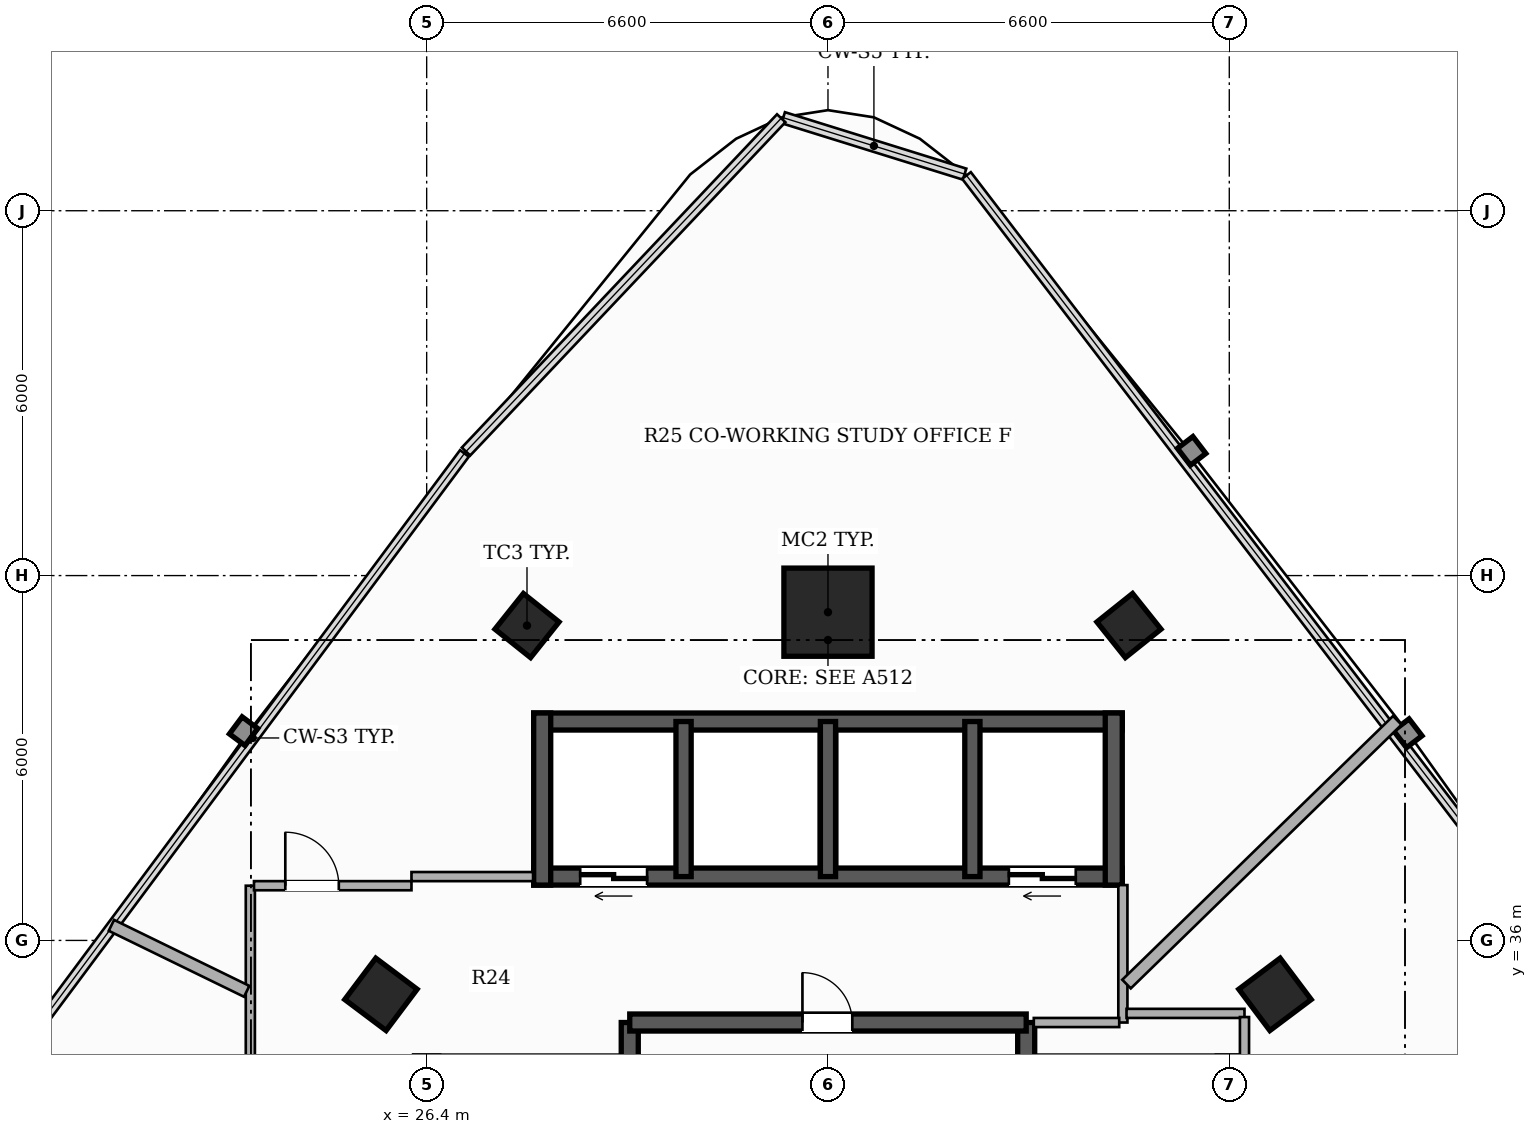
"""IFC4 building model, lengths in metres.
Left out: names, types, materials, properties, quantities, classifications, styles, units other than length and angle.
Written with IfcOpenShell. Run it as: python <this file> out.ifc"""

import sys

from ifc_helpers import new_model, si_unit, direction, frame, frame_2d, origin, origin_2d, place, context, subcontext, project, spatial, rectangle, hollow_rectangle, extrude, element, fill, save


model = new_model("IFC4")
c1 = context("Model", 3, precision=1e-05, world=origin(), true_north=direction((0.0, 1.0)))
c2 = subcontext(c1, "Body", "Model", "MODEL_VIEW")
j1 = project(units=[si_unit("LENGTHUNIT", "METRE"), si_unit("PLANEANGLEUNIT", "RADIAN")], contexts=[c1])
p1 = place(None, origin())
s1 = spatial("IfcSite", under=j1, at=p1, CompositionType="ELEMENT")
p2 = place(p1, origin())
s2 = spatial("IfcBuilding", under=s1, at=p2, CompositionType="ELEMENT")
p3 = place(p2, frame((0.0, 0.0, 113.3)))
s3 = spatial("IfcBuildingStorey", under=s2, at=p3, CompositionType="ELEMENT", Elevation=113.3)
p4 = place(p3, frame((29.74, 26.5, 0.0), z_axis=(0.0, 0.0, 1.0), x_axis=(0.0, 1.0, 0.0)))
e1 = element("IfcWall", 1, at=p4, inside=s3, PredefinedType="SHEAR", context=c2, shape_type="SweptSolid", body=[
    extrude(rectangle(XDim=8.15, YDim=0.28, at=frame_2d((4.075, 0.0))), origin(), (0.0, 0.0, 1.0), 3.3),
])
p5 = place(p4, frame((0.6, 0.0, 0.0)))
e2 = element("IfcOpeningElement", 2, at=p5, cuts=e1, PredefinedType="OPENING", context=c2, shape_type="SweptSolid", body=[
    extrude(rectangle(XDim=1.05, YDim=2.15, at=frame_2d((0.525, 1.075))), frame((0.0, 0.15, 0.0), z_axis=(0.0, -1.0, 0.0), x_axis=(1.0, 0.0, 0.0)), (0.0, 0.0, 1.0), 0.3),
])
p6 = place(p3, frame((36.26, 26.5, 0.0), z_axis=(0.0, 0.0, 1.0), x_axis=(0.0, 1.0, 0.0)))
e3 = element("IfcWall", 3, at=p6, inside=s3, PredefinedType="SHEAR", context=c2, shape_type="SweptSolid", body=[
    extrude(rectangle(XDim=8.15, YDim=0.28, at=frame_2d((4.075, 0.0))), origin(), (0.0, 0.0, 1.0), 3.3),
])
p7 = place(p6, frame((0.6, 0.0, 0.0)))
e4 = element("IfcOpeningElement", 4, at=p7, cuts=e3, PredefinedType="OPENING", context=c2, shape_type="SweptSolid", body=[
    extrude(rectangle(XDim=1.05, YDim=2.15, at=frame_2d((0.525, 1.075))), frame((0.0, 0.15, 0.0), z_axis=(0.0, -1.0, 0.0), x_axis=(1.0, 0.0, 0.0)), (0.0, 0.0, 1.0), 0.3),
])
p8 = place(p3, frame((29.74, 34.65, 0.0), z_axis=(0.0, 0.0, 1.0), x_axis=(1.0, 0.0, 0.0)))
e5 = element("IfcWall", 5, at=p8, inside=s3, PredefinedType="SHEAR", context=c2, shape_type="SweptSolid", body=[
    extrude(rectangle(XDim=6.52, YDim=0.28, at=frame_2d((3.26, 0.0))), origin(), (0.0, 0.0, 1.0), 3.3),
])
p9 = place(p8, frame((2.84, 0.0, 0.0)))
e6 = element("IfcOpeningElement", 6, at=p9, cuts=e5, PredefinedType="OPENING", context=c2, shape_type="SweptSolid", body=[
    extrude(rectangle(XDim=0.82, YDim=2.1, at=frame_2d((0.41, 1.05))), frame((0.0, 0.15, 0.0), z_axis=(0.0, -1.0, 0.0), x_axis=(1.0, 0.0, 0.0)), (0.0, 0.0, 1.0), 0.3),
])
p10 = place(p3, frame((37.84, 37.05, 0.0), z_axis=(0.0, 0.0, 1.0), x_axis=(-1.0, 0.0, 0.0)))
e7 = element("IfcWall", 7, at=p10, inside=s3, PredefinedType="SHEAR", context=c2, shape_type="SweptSolid", body=[
    extrude(rectangle(XDim=9.68, YDim=0.28, at=frame_2d((4.84, 0.0))), origin(), (0.0, 0.0, 1.0), 3.3),
])
p11 = place(p10, frame((7.815, 0.0, 0.0)))
e8 = element("IfcOpeningElement", 8, at=p11, cuts=e7, PredefinedType="OPENING", context=c2, shape_type="SweptSolid", body=[
    extrude(rectangle(XDim=1.1, YDim=2.2, at=frame_2d((0.55, 1.1))), frame((0.0, 0.15, 0.0), z_axis=(0.0, -1.0, 0.0), x_axis=(1.0, 0.0, 0.0)), (0.0, 0.0, 1.0), 0.3),
])
p12 = place(p10, frame((0.765, 0.0, 0.0)))
e9 = element("IfcOpeningElement", 9, at=p12, cuts=e7, PredefinedType="OPENING", context=c2, shape_type="SweptSolid", body=[
    extrude(rectangle(XDim=1.1, YDim=2.2, at=frame_2d((0.55, 1.1))), frame((0.0, 0.15, 0.0), z_axis=(0.0, -1.0, 0.0), x_axis=(1.0, 0.0, 0.0)), (0.0, 0.0, 1.0), 0.3),
])
p13 = place(p3, frame((28.16, 39.6, 0.0), z_axis=(0.0, 0.0, 1.0), x_axis=(1.0, 0.0, 0.0)))
e10 = element("IfcWall", 10, at=p13, inside=s3, PredefinedType="SHEAR", context=c2, shape_type="SweptSolid", body=[
    extrude(rectangle(XDim=9.68, YDim=0.28, at=frame_2d((4.84, 0.0))), origin(), (0.0, 0.0, 1.0), 3.3),
])
for number, where, z_axis, x_axis in (
    (11, (28.3, 36.91, 0.0), (0.0, 0.0, 1.0), (0.0, 1.0, 0.0)),
    (12, (37.7, 36.91, 0.0), (0.0, 0.0, 1.0), (0.0, 1.0, 0.0)),
):
    element("IfcWall", number, at=place(p3, frame(where, z_axis=z_axis, x_axis=x_axis)), inside=s3, PredefinedType="SHEAR", context=c2, shape_type="SweptSolid", body=[
        extrude(rectangle(XDim=2.83, YDim=0.28, at=frame_2d((1.415, 0.0))), origin(), (0.0, 0.0, 1.0), 3.3),
    ])
for number, where, z_axis, x_axis in (
    (13, (30.625, 37.05, 0.0), (0.0, 0.0, 1.0), (0.0, 1.0, 0.0)),
    (14, (33.0, 37.05, 0.0), (0.0, 0.0, 1.0), (0.0, 1.0, 0.0)),
    (15, (35.375, 37.05, 0.0), (0.0, 0.0, 1.0), (0.0, 1.0, 0.0)),
):
    element("IfcWall", number, at=place(p3, frame(where, z_axis=z_axis, x_axis=x_axis)), inside=s3, PredefinedType="SHEAR", context=c2, shape_type="SweptSolid", body=[
        extrude(rectangle(XDim=2.55, YDim=0.25, at=frame_2d((1.275, 0.0))), origin(), (0.0, 0.0, 1.0), 3.3),
    ])
p14 = place(p3, frame((33.0, 41.398, 0.0), z_axis=(0.0, 0.0, 1.0), x_axis=(1.0, 0.0, 0.0)))
e16 = element("IfcColumn", 16, at=p14, inside=s3, PredefinedType="COLUMN", context=c2, shape_type="SweptSolid", body=[
    extrude(hollow_rectangle(XDim=1.45, YDim=1.45, WallThickness=0.045, at=origin_2d()), origin(), (0.0, 0.0, 1.0), 3.3),
])
for number, where, z_axis, x_axis in (
    (17, (25.648, 35.113, 0.0), (0.0, 0.0, 1.0), (0.6, 0.8, 0.0)),
    (18, (40.352, 35.113, 0.0), (0.0, 0.0, 1.0), (-0.6, 0.8, 0.0)),
):
    element("IfcColumn", number, at=place(p3, frame(where, z_axis=z_axis, x_axis=x_axis)), inside=s3, PredefinedType="COLUMN", context=c2, shape_type="SweptSolid", body=[
        extrude(hollow_rectangle(XDim=0.85, YDim=0.85, WallThickness=0.028, at=origin_2d()), origin(), (0.0, 0.0, 1.0), 3.3),
    ])
for number, where, z_axis, x_axis in (
    (19, (28.05, 41.178, 0.0), (0.0, 0.0, 1.0), (0.624, 0.782, 0.0)),
    (20, (37.95, 41.178, 0.0), (0.0, 0.0, 1.0), (-0.624, 0.782, 0.0)),
):
    element("IfcColumn", number, at=place(p3, frame(where, z_axis=z_axis, x_axis=x_axis)), inside=s3, PredefinedType="COLUMN", context=c2, shape_type="SweptSolid", body=[
        extrude(hollow_rectangle(XDim=0.75, YDim=0.75, WallThickness=0.025, at=origin_2d()), origin(), (0.0, 0.0, 1.0), 3.3),
    ])
p15 = place(p3, frame((37.85, 34.65, 0.0), z_axis=(0.0, 0.0, 1.0), x_axis=(0.0, 1.0, 0.0)))
e21 = element("IfcWall", 21, at=p15, inside=s3, PredefinedType="PARTITIONING", context=c2, shape_type="SweptSolid", body=[
    extrude(rectangle(XDim=2.26, YDim=0.15, at=frame_2d((1.13, 0.0))), origin(), (0.0, 0.0, 1.0), 3.06),
])
p16 = place(p3, frame((36.385, 34.65, 0.0), z_axis=(0.0, 0.0, 1.0), x_axis=(1.0, 0.0, 0.0)))
e22 = element("IfcWall", 22, at=p16, inside=s3, PredefinedType="PARTITIONING", context=c2, shape_type="SweptSolid", body=[
    extrude(rectangle(XDim=1.405, YDim=0.15, at=frame_2d((0.703, 0.0))), origin(), (0.0, 0.0, 1.0), 2.425),
])
p17 = place(p3, frame((23.5, 14.06, 0.0), z_axis=(0.0, 0.0, 1.0), x_axis=(0.0, 1.0, 0.0)))
e23 = element("IfcWall", 23, at=p17, inside=s3, PredefinedType="PARTITIONING", context=c2, shape_type="SweptSolid", body=[
    extrude(rectangle(XDim=22.84, YDim=0.15, at=frame_2d((11.42, 0.0))), origin(), (0.0, 0.0, 1.0), 2.413),
])
p18 = place(p17, frame((13.373, 0.0, 0.0)))
e24 = element("IfcOpeningElement", 24, at=p18, cuts=e23, PredefinedType="OPENING", context=c2, shape_type="SweptSolid", body=[
    extrude(rectangle(XDim=0.88, YDim=2.1, at=frame_2d((0.44, 1.05))), frame((0.0, 0.085, 0.0), z_axis=(0.0, -1.0, 0.0), x_axis=(1.0, 0.0, 0.0)), (0.0, 0.0, 1.0), 0.17),
])
p19 = place(p17, frame((3.002, 0.0, 0.0)))
e25 = element("IfcOpeningElement", 25, at=p19, cuts=e23, PredefinedType="OPENING", context=c2, shape_type="SweptSolid", body=[
    extrude(rectangle(XDim=0.92, YDim=2.15, at=frame_2d((0.46, 1.075))), frame((0.0, 0.085, 0.0), z_axis=(0.0, -1.0, 0.0), x_axis=(1.0, 0.0, 0.0)), (0.0, 0.0, 1.0), 0.17),
])
p20 = place(p3, frame((23.56, 36.9, 0.0), z_axis=(0.0, 0.0, 1.0), x_axis=(1.0, 0.0, 0.0)))
e26 = element("IfcWall", 26, at=p20, inside=s3, PredefinedType="PARTITIONING", context=c2, shape_type="SweptSolid", body=[
    extrude(rectangle(XDim=2.59, YDim=0.15, at=frame_2d((1.295, 0.0))), origin(), (0.0, 0.0, 1.0), 2.413),
])
p21 = place(p20, frame((0.515, 0.0, 0.0)))
e27 = element("IfcOpeningElement", 27, at=p21, cuts=e26, PredefinedType="OPENING", context=c2, shape_type="SweptSolid", body=[
    extrude(rectangle(XDim=0.88, YDim=2.1, at=frame_2d((0.44, 1.05))), frame((0.0, 0.085, 0.0), z_axis=(0.0, -1.0, 0.0), x_axis=(1.0, 0.0, 0.0)), (0.0, 0.0, 1.0), 0.17),
])
p22 = place(p3, frame((26.15, 37.05, 0.0), z_axis=(0.0, 0.0, 1.0), x_axis=(1.0, 0.0, 0.0)))
e28 = element("IfcWall", 28, at=p22, inside=s3, PredefinedType="PARTITIONING", context=c2, shape_type="SweptSolid", body=[
    extrude(rectangle(XDim=2.0, YDim=0.15, at=frame_2d((1.0, 0.0))), origin(), (0.0, 0.0, 1.0), 2.413),
])
p23 = place(p3, frame((37.91, 34.8, 0.0), z_axis=(0.0, 0.0, 1.0), x_axis=(1.0, 0.0, 0.0)))
e29 = element("IfcWall", 29, at=p23, inside=s3, PredefinedType="PARTITIONING", context=c2, shape_type="SweptSolid", body=[
    extrude(rectangle(XDim=1.94, YDim=0.15, at=frame_2d((0.97, 0.0))), origin(), (0.0, 0.0, 1.0), 2.721),
])
p24 = place(p3, frame((39.85, 34.74, 0.0), z_axis=(0.0, 0.0, 1.0), x_axis=(0.0, -1.0, 0.0)))
e30 = element("IfcWall", 30, at=p24, inside=s3, PredefinedType="PARTITIONING", context=c2, shape_type="SweptSolid", body=[
    extrude(rectangle(XDim=0.64, YDim=0.15, at=frame_2d((0.32, 0.0))), origin(), (0.0, 0.0, 1.0), 2.721),
])
p25 = place(p3, frame((21.215, 36.248, 0.0), z_axis=(0.0, 0.0, 1.0), x_axis=(0.898821522371, -0.438314808012, 0.0)))
e31 = element("IfcWall", 31, at=p25, inside=s3, PredefinedType="PARTITIONING", context=c2, shape_type="SweptSolid", body=[
    extrude(rectangle(XDim=2.475, YDim=0.2, at=frame_2d((1.238, 0.0))), origin(), (0.0, 0.0, 1.0), 3.06),
])
p26 = place(p3, frame((37.91, 35.282, 0.0), z_axis=(0.0, 0.0, 1.0), x_axis=(0.716392659664, 0.697697324905, 0.0)))
e32 = element("IfcWall", 32, at=p26, inside=s3, PredefinedType="PARTITIONING", context=c2, shape_type="SweptSolid", body=[
    extrude(rectangle(XDim=6.216, YDim=0.2, at=frame_2d((3.108, 0.0))), origin(), (0.0, 0.0, 1.0), 2.413),
])
p27 = place(p11, origin())
e33 = element("IfcDoor", 33, at=p27, inside=s3, OperationType="DOUBLE_DOOR_SLIDING", PredefinedType="DOOR", context=c2, shape_type="SweptSolid", body=[
    extrude(rectangle(XDim=1.1, YDim=2.2, at=frame_2d((0.55, 1.1))), frame((0.0, 0.025, 0.0), z_axis=(0.0, -1.0, 0.0), x_axis=(1.0, 0.0, 0.0)), (0.0, 0.0, 1.0), 0.05),
])
fill(e8, e33)
p28 = place(p12, origin())
e34 = element("IfcDoor", 34, at=p28, inside=s3, OperationType="DOUBLE_DOOR_SLIDING", PredefinedType="DOOR", context=c2, shape_type="SweptSolid", body=[
    extrude(rectangle(XDim=1.1, YDim=2.2, at=frame_2d((0.55, 1.1))), frame((0.0, 0.025, 0.0), z_axis=(0.0, -1.0, 0.0), x_axis=(1.0, 0.0, 0.0)), (0.0, 0.0, 1.0), 0.05),
])
fill(e9, e34)
p29 = place(p9, origin())
e35 = element("IfcDoor", 35, at=p29, inside=s3, OperationType="SINGLE_SWING_LEFT", PredefinedType="DOOR", context=c2, shape_type="SweptSolid", body=[
    extrude(rectangle(XDim=0.82, YDim=2.1, at=frame_2d((0.41, 1.05))), frame((0.0, 0.025, 0.0), z_axis=(0.0, -1.0, 0.0), x_axis=(1.0, 0.0, 0.0)), (0.0, 0.0, 1.0), 0.05),
])
fill(e6, e35)
p30 = place(p21, origin())
e36 = element("IfcDoor", 36, at=p30, inside=s3, OperationType="SINGLE_SWING_LEFT", PredefinedType="DOOR", context=c2, shape_type="SweptSolid", body=[
    extrude(rectangle(XDim=0.88, YDim=2.1, at=frame_2d((0.44, 1.05))), frame((0.0, 0.025, 0.0), z_axis=(0.0, -1.0, 0.0), x_axis=(1.0, 0.0, 0.0)), (0.0, 0.0, 1.0), 0.05),
])
fill(e27, e36)
save(model, sys.argv[1])
